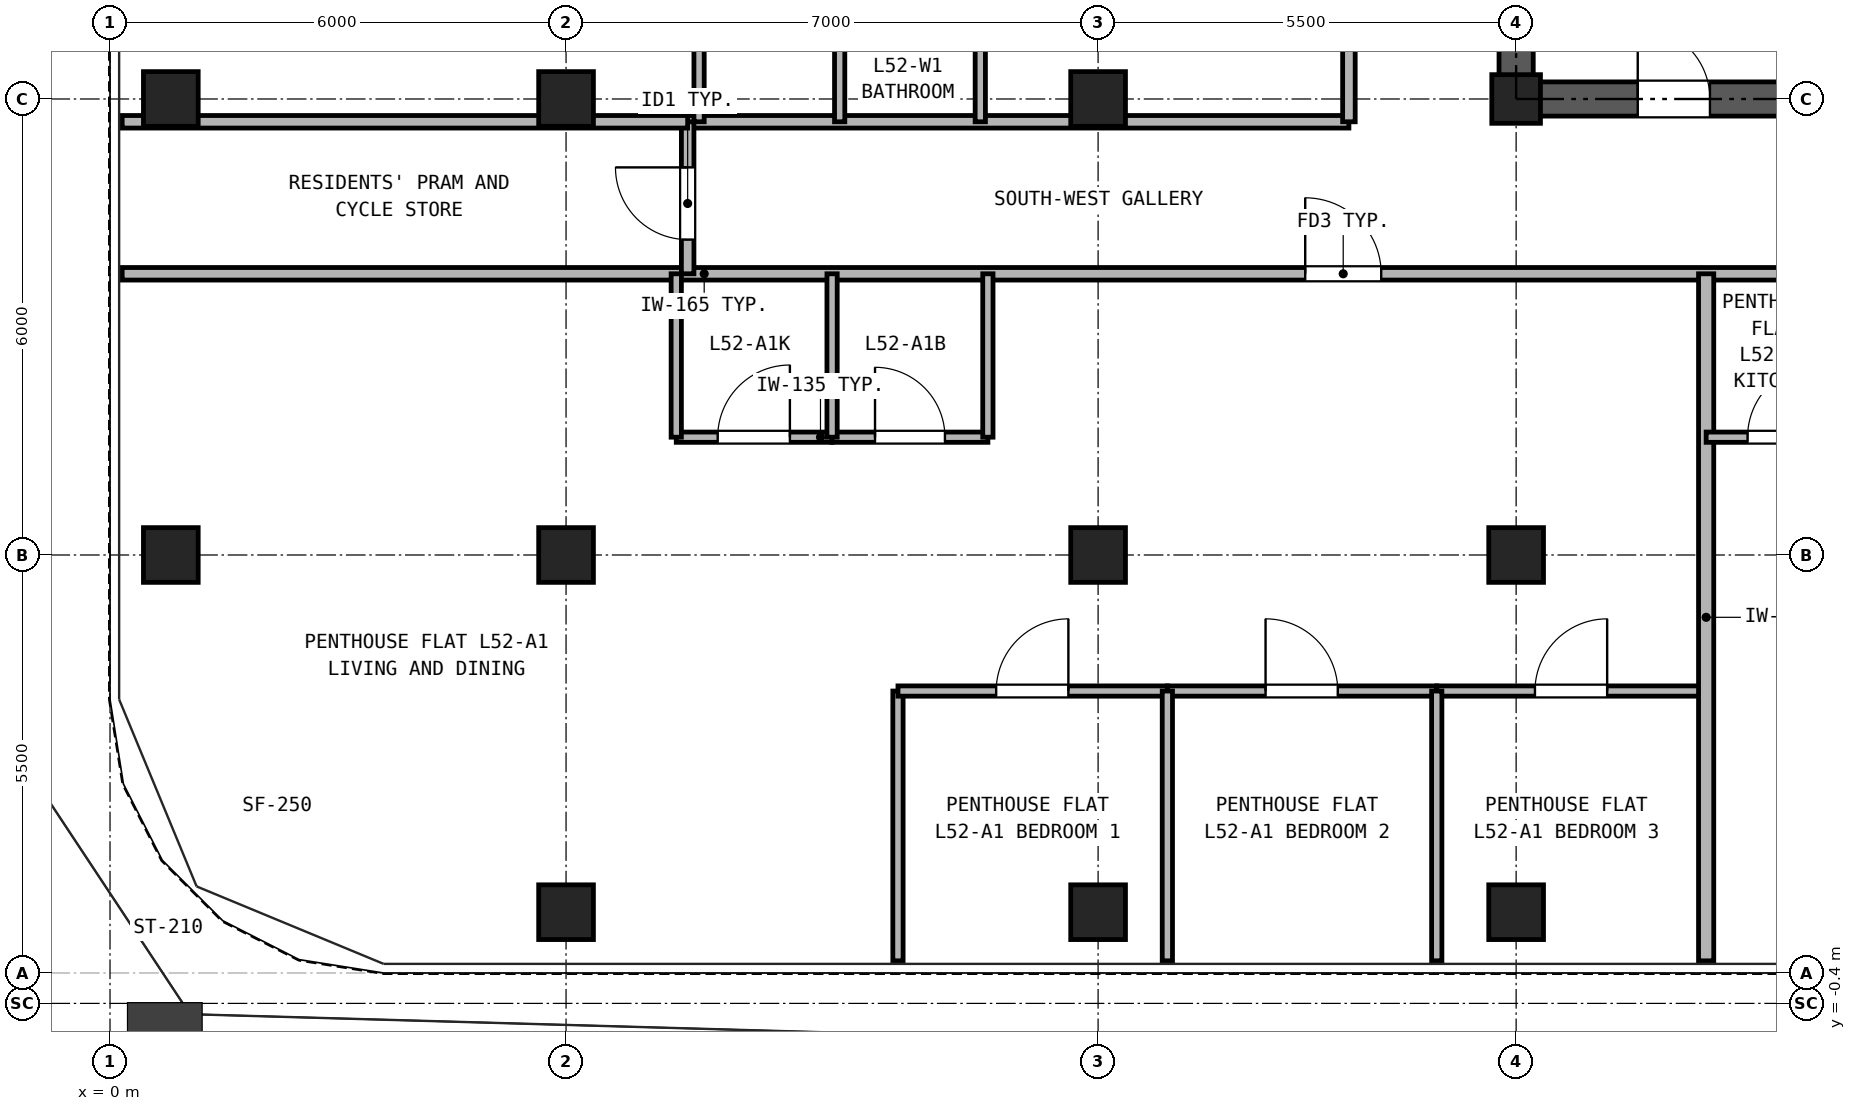
"""IFC4 building model, lengths in metres.
Left out: names, types, materials, properties, quantities, classifications, styles, units other than length and angle.
Written with IfcOpenShell. Run it as: python <this file> out.ifc"""

import sys

from ifc_helpers import new_model, si_unit, direction, frame, frame_2d, origin, origin_2d, place, context, subcontext, project, spatial, rectangle, hollow_rectangle, extrude, source, transform, mapped, element, fill, save


model = new_model("IFC4")
c1 = context("Model", 3, precision=1e-05, world=origin(), true_north=direction((0.0, 1.0)))
c2 = subcontext(c1, "Body", "Model", "MODEL_VIEW")
j1 = project(units=[si_unit("LENGTHUNIT", "METRE"), si_unit("PLANEANGLEUNIT", "RADIAN")], contexts=[c1])
p1 = place(None, origin())
s1 = spatial("IfcSite", under=j1, at=p1, CompositionType="ELEMENT")
p2 = place(p1, origin())
s2 = spatial("IfcBuilding", under=s1, at=p2, CompositionType="ELEMENT")
p3 = place(p2, frame((0.0, 0.0, 184.9)))
s3 = spatial("IfcBuildingStorey", under=s2, at=p3, CompositionType="ELEMENT", Elevation=184.9)
m1 = source(origin(), c2, "Body", "SweptSolid", [
    extrude(hollow_rectangle(XDim=0.72, YDim=0.72, WallThickness=0.04, at=origin_2d()), origin(), (0.0, 0.0, 1.0), 2.84),
])
for number, where, z_axis, x_axis in (
    (1, (6.0, 0.8, 0.0), (0.0, 0.0, 1.0), (1.0, 0.0, 0.0)),
    (2, (13.0, 0.8, 0.0), (0.0, 0.0, 1.0), (1.0, 0.0, 0.0)),
    (3, (18.5, 0.8, 0.0), (0.0, 0.0, 1.0), (1.0, 0.0, 0.0)),
    (4, (0.8, 5.5, 0.0), (0.0, 0.0, 1.0), (1.0, 0.0, 0.0)),
    (5, (0.8, 11.5, 0.0), (0.0, 0.0, 1.0), (1.0, 0.0, 0.0)),
    (6, (6.0, 5.5, 0.0), (0.0, 0.0, 1.0), (1.0, 0.0, 0.0)),
    (7, (6.0, 11.5, 0.0), (0.0, 0.0, 1.0), (1.0, 0.0, 0.0)),
    (8, (13.0, 5.5, 0.0), (0.0, 0.0, 1.0), (1.0, 0.0, 0.0)),
    (9, (13.0, 11.5, 0.0), (0.0, 0.0, 1.0), (1.0, 0.0, 0.0)),
    (10, (18.5, 5.5, 0.0), (0.0, 0.0, 1.0), (1.0, 0.0, 0.0)),
):
    element("IfcColumn", number, at=place(p3, frame(where, z_axis=z_axis, x_axis=x_axis)), inside=s3, PredefinedType="COLUMN", context=c2, shape_type="MappedRepresentation", body=[
        mapped(m1, transform((0.0, 0.0, 0.0), x_axis=(1.0, 0.0, 0.0), y_axis=(0.0, 1.0, 0.0), z_axis=(0.0, 0.0, 1.0), scale=1.0)),
    ])
m2 = source(origin(), c2, "Body", "SweptSolid", [
    extrude(hollow_rectangle(XDim=0.64, YDim=0.64, WallThickness=0.035, at=origin_2d()), origin(), (0.0, 0.0, 1.0), 2.84),
])
p4 = place(p3, frame((18.5, 11.5, 0.0), z_axis=(0.0, 0.0, 1.0), x_axis=(1.0, 0.0, 0.0)))
e11 = element("IfcColumn", 11, at=p4, inside=s3, PredefinedType="COLUMN", context=c2, shape_type="MappedRepresentation", body=[
    mapped(m2, transform((0.0, 0.0, 0.0), x_axis=(1.0, 0.0, 0.0), y_axis=(0.0, 1.0, 0.0), z_axis=(0.0, 0.0, 1.0), scale=1.0)),
])
p5 = place(p3, frame((18.275, 11.5, 0.0), z_axis=(0.0, 0.0, 1.0), x_axis=(1.0, 0.0, 0.0)))
e12 = element("IfcWall", 12, at=p5, inside=s3, PredefinedType="SHEAR", context=c2, shape_type="SweptSolid", body=[
    extrude(rectangle(XDim=10.45, YDim=0.45, at=frame_2d((5.225, 0.0))), origin(), (0.0, 0.0, 1.0), 2.84),
])
p6 = place(p5, frame((1.825, 0.0, 0.0)))
e13 = element("IfcOpeningElement", 13, at=p6, cuts=e12, PredefinedType="OPENING", context=c2, shape_type="SweptSolid", body=[
    extrude(rectangle(XDim=0.95, YDim=2.15, at=frame_2d((0.475, 1.075))), frame((0.0, 0.235, 0.0), z_axis=(0.0, -1.0, 0.0), x_axis=(1.0, 0.0, 0.0)), (0.0, 0.0, 1.0), 0.47),
])
p7 = place(p5, frame((5.325, 0.0, 0.0)))
e14 = element("IfcOpeningElement", 14, at=p7, cuts=e12, PredefinedType="OPENING", context=c2, shape_type="SweptSolid", body=[
    extrude(rectangle(XDim=0.95, YDim=2.15, at=frame_2d((0.475, 1.075))), frame((0.0, 0.235, 0.0), z_axis=(0.0, -1.0, 0.0), x_axis=(1.0, 0.0, 0.0)), (0.0, 0.0, 1.0), 0.47),
])
p8 = place(p5, frame((8.225, 0.0, 0.0)))
e15 = element("IfcOpeningElement", 15, at=p8, cuts=e12, PredefinedType="OPENING", context=c2, shape_type="SweptSolid", body=[
    extrude(rectangle(XDim=1.1, YDim=2.25, at=frame_2d((0.55, 1.125))), frame((0.0, 0.235, 0.0), z_axis=(0.0, -1.0, 0.0), x_axis=(1.0, 0.0, 0.0)), (0.0, 0.0, 1.0), 0.47),
])
p9 = place(p3, frame((18.5, 11.725, 0.0), z_axis=(0.0, 0.0, 1.0), x_axis=(0.0, 1.0, 0.0)))
e16 = element("IfcWall", 16, at=p9, inside=s3, PredefinedType="SHEAR", context=c2, shape_type="SweptSolid", body=[
    extrude(rectangle(XDim=16.8, YDim=0.45, at=frame_2d((8.4, 0.0))), origin(), (0.0, 0.0, 1.0), 2.84),
])
p10 = place(p9, frame((7.425, 0.0, 0.0)))
e17 = element("IfcOpeningElement", 17, at=p10, cuts=e16, PredefinedType="OPENING", context=c2, shape_type="SweptSolid", body=[
    extrude(rectangle(XDim=1.15, YDim=2.2, at=frame_2d((0.575, 1.1))), frame((0.0, 0.235, 0.0), z_axis=(0.0, -1.0, 0.0), x_axis=(1.0, 0.0, 0.0)), (0.0, 0.0, 1.0), 0.47),
])
p11 = place(p3, frame((0.16, 9.2, 0.0), z_axis=(0.0, 0.0, 1.0), x_axis=(1.0, 0.0, 0.0)))
e18 = element("IfcWall", 18, at=p11, inside=s3, PredefinedType="PARTITIONING", context=c2, shape_type="SweptSolid", body=[
    extrude(rectangle(XDim=41.48, YDim=0.165, at=frame_2d((20.74, 0.0))), origin(), (0.0, 0.0, 1.0), 2.84),
])
p12 = place(p11, frame((15.565, 0.0, 0.0)))
e19 = element("IfcOpeningElement", 19, at=p12, cuts=e18, PredefinedType="OPENING", context=c2, shape_type="SweptSolid", body=[
    extrude(rectangle(XDim=1.0, YDim=2.15, at=frame_2d((0.5, 1.075))), frame((0.0, 0.093, 0.0), z_axis=(0.0, -1.0, 0.0), x_axis=(1.0, 0.0, 0.0)), (0.0, 0.0, 1.0), 0.185),
])
p13 = place(p11, frame((30.94, 0.0, 0.0)))
e20 = element("IfcOpeningElement", 20, at=p13, cuts=e18, PredefinedType="OPENING", context=c2, shape_type="SweptSolid", body=[
    extrude(rectangle(XDim=1.0, YDim=2.15, at=frame_2d((0.5, 1.075))), frame((0.0, 0.093, 0.0), z_axis=(0.0, -1.0, 0.0), x_axis=(1.0, 0.0, 0.0)), (0.0, 0.0, 1.0), 0.185),
])
p14 = place(p3, frame((7.6, 11.2, 0.0), z_axis=(0.0, 0.0, 1.0), x_axis=(1.0, 0.0, 0.0)))
e21 = element("IfcWall", 21, at=p14, inside=s3, PredefinedType="PARTITIONING", context=c2, shape_type="SweptSolid", body=[
    extrude(rectangle(XDim=8.7, YDim=0.165, at=frame_2d((4.35, 0.0))), origin(), (0.0, 0.0, 1.0), 2.84),
])
p15 = place(p3, frame((7.6, 9.2, 0.0), z_axis=(0.0, 0.0, 1.0), x_axis=(0.0, 1.0, 0.0)))
e22 = element("IfcWall", 22, at=p15, inside=s3, PredefinedType="PARTITIONING", context=c2, shape_type="SweptSolid", body=[
    extrude(rectangle(XDim=2.0, YDim=0.165, at=frame_2d((1.0, 0.0))), origin(), (0.0, 0.0, 1.0), 2.84),
])
p16 = place(p15, frame((0.45, 0.0, 0.0)))
e23 = element("IfcOpeningElement", 23, at=p16, cuts=e22, PredefinedType="OPENING", context=c2, shape_type="SweptSolid", body=[
    extrude(rectangle(XDim=0.95, YDim=2.15, at=frame_2d((0.475, 1.075))), frame((0.0, 0.093, 0.0), z_axis=(0.0, -1.0, 0.0), x_axis=(1.0, 0.0, 0.0)), (0.0, 0.0, 1.0), 0.185),
])
p17 = place(p3, frame((16.3, 11.2, 0.0), z_axis=(0.0, 0.0, 1.0), x_axis=(0.0, 1.0, 0.0)))
e24 = element("IfcWall", 24, at=p17, inside=s3, PredefinedType="PARTITIONING", context=c2, shape_type="SweptSolid", body=[
    extrude(rectangle(XDim=23.94, YDim=0.165, at=frame_2d((11.97, 0.0))), origin(), (0.0, 0.0, 1.0), 2.84),
])
p18 = place(p17, frame((5.4, 0.0, 0.0)))
e25 = element("IfcOpeningElement", 25, at=p18, cuts=e24, PredefinedType="OPENING", context=c2, shape_type="SweptSolid", body=[
    extrude(rectangle(XDim=1.0, YDim=2.15, at=frame_2d((0.5, 1.075))), frame((0.0, 0.093, 0.0), z_axis=(0.0, -1.0, 0.0), x_axis=(1.0, 0.0, 0.0)), (0.0, 0.0, 1.0), 0.185),
])
p19 = place(p17, frame((14.95, 0.0, 0.0)))
e26 = element("IfcOpeningElement", 26, at=p19, cuts=e24, PredefinedType="OPENING", context=c2, shape_type="SweptSolid", body=[
    extrude(rectangle(XDim=1.0, YDim=2.15, at=frame_2d((0.5, 1.075))), frame((0.0, 0.093, 0.0), z_axis=(0.0, -1.0, 0.0), x_axis=(1.0, 0.0, 0.0)), (0.0, 0.0, 1.0), 0.185),
])
p20 = place(p3, frame((7.45, 7.05, 0.0), z_axis=(0.0, 0.0, 1.0), x_axis=(1.0, 0.0, 0.0)))
e27 = element("IfcWall", 27, at=p20, inside=s3, PredefinedType="PARTITIONING", context=c2, shape_type="SweptSolid", body=[
    extrude(rectangle(XDim=2.05, YDim=0.135, at=frame_2d((1.025, 0.0))), origin(), (0.0, 0.0, 1.0), 2.84),
])
p21 = place(p20, frame((0.545, 0.0, 0.0)))
e28 = element("IfcOpeningElement", 28, at=p21, cuts=e27, PredefinedType="OPENING", context=c2, shape_type="SweptSolid", body=[
    extrude(rectangle(XDim=0.95, YDim=2.15, at=frame_2d((0.475, 1.075))), frame((0.0, 0.077, 0.0), z_axis=(0.0, -1.0, 0.0), x_axis=(1.0, 0.0, 0.0)), (0.0, 0.0, 1.0), 0.155),
])
p22 = place(p3, frame((9.5, 7.05, 0.0), z_axis=(0.0, 0.0, 1.0), x_axis=(1.0, 0.0, 0.0)))
e29 = element("IfcWall", 29, at=p22, inside=s3, PredefinedType="PARTITIONING", context=c2, shape_type="SweptSolid", body=[
    extrude(rectangle(XDim=2.05, YDim=0.135, at=frame_2d((1.025, 0.0))), origin(), (0.0, 0.0, 1.0), 2.84),
])
p23 = place(p22, frame((0.565, 0.0, 0.0)))
e30 = element("IfcOpeningElement", 30, at=p23, cuts=e29, PredefinedType="OPENING", context=c2, shape_type="SweptSolid", body=[
    extrude(rectangle(XDim=0.92, YDim=2.1, at=frame_2d((0.46, 1.05))), frame((0.0, 0.077, 0.0), z_axis=(0.0, -1.0, 0.0), x_axis=(1.0, 0.0, 0.0)), (0.0, 0.0, 1.0), 0.155),
])
for number, where, z_axis, x_axis in (
    (31, (7.45, 7.05, 0.0), (0.0, 0.0, 1.0), (0.0, 1.0, 0.0)),
    (32, (9.5, 7.05, 0.0), (0.0, 0.0, 1.0), (0.0, 1.0, 0.0)),
    (33, (11.55, 7.05, 0.0), (0.0, 0.0, 1.0), (0.0, 1.0, 0.0)),
):
    element("IfcWall", number, at=place(p3, frame(where, z_axis=z_axis, x_axis=x_axis)), inside=s3, PredefinedType="PARTITIONING", context=c2, shape_type="SweptSolid", body=[
        extrude(rectangle(XDim=2.15, YDim=0.135, at=frame_2d((1.075, 0.0))), origin(), (0.0, 0.0, 1.0), 2.84),
    ])
p24 = place(p3, frame((10.367, 0.16, 0.0), z_axis=(0.0, 0.0, 1.0), x_axis=(0.0, 1.0, 0.0)))
e34 = element("IfcWall", 34, at=p24, inside=s3, PredefinedType="PARTITIONING", context=c2, shape_type="SweptSolid", body=[
    extrude(rectangle(XDim=3.55, YDim=0.135, at=frame_2d((1.775, 0.0))), origin(), (0.0, 0.0, 1.0), 2.84),
])
p25 = place(p3, frame((10.367, 3.71, 0.0), z_axis=(0.0, 0.0, 1.0), x_axis=(1.0, 0.0, 0.0)))
e35 = element("IfcWall", 35, at=p25, inside=s3, PredefinedType="PARTITIONING", context=c2, shape_type="SweptSolid", body=[
    extrude(rectangle(XDim=3.544, YDim=0.135, at=frame_2d((1.772, 0.0))), origin(), (0.0, 0.0, 1.0), 2.84),
])
p26 = place(p25, frame((1.292, 0.0, 0.0)))
e36 = element("IfcOpeningElement", 36, at=p26, cuts=e35, PredefinedType="OPENING", context=c2, shape_type="SweptSolid", body=[
    extrude(rectangle(XDim=0.95, YDim=2.15, at=frame_2d((0.475, 1.075))), frame((0.0, 0.077, 0.0), z_axis=(0.0, -1.0, 0.0), x_axis=(1.0, 0.0, 0.0)), (0.0, 0.0, 1.0), 0.155),
])
p27 = place(p3, frame((13.911, 3.71, 0.0), z_axis=(0.0, 0.0, 1.0), x_axis=(1.0, 0.0, 0.0)))
e37 = element("IfcWall", 37, at=p27, inside=s3, PredefinedType="PARTITIONING", context=c2, shape_type="SweptSolid", body=[
    extrude(rectangle(XDim=3.544, YDim=0.135, at=frame_2d((1.772, 0.0))), origin(), (0.0, 0.0, 1.0), 2.84),
])
p28 = place(p27, frame((1.292, 0.0, 0.0)))
e38 = element("IfcOpeningElement", 38, at=p28, cuts=e37, PredefinedType="OPENING", context=c2, shape_type="SweptSolid", body=[
    extrude(rectangle(XDim=0.95, YDim=2.15, at=frame_2d((0.475, 1.075))), frame((0.0, 0.077, 0.0), z_axis=(0.0, -1.0, 0.0), x_axis=(1.0, 0.0, 0.0)), (0.0, 0.0, 1.0), 0.155),
])
p29 = place(p3, frame((13.911, 0.16, 0.0), z_axis=(0.0, 0.0, 1.0), x_axis=(0.0, 1.0, 0.0)))
e39 = element("IfcWall", 39, at=p29, inside=s3, PredefinedType="PARTITIONING", context=c2, shape_type="SweptSolid", body=[
    extrude(rectangle(XDim=3.55, YDim=0.135, at=frame_2d((1.775, 0.0))), origin(), (0.0, 0.0, 1.0), 2.84),
])
p30 = place(p3, frame((17.456, 3.71, 0.0), z_axis=(0.0, 0.0, 1.0), x_axis=(1.0, 0.0, 0.0)))
e40 = element("IfcWall", 40, at=p30, inside=s3, PredefinedType="PARTITIONING", context=c2, shape_type="SweptSolid", body=[
    extrude(rectangle(XDim=3.544, YDim=0.135, at=frame_2d((1.772, 0.0))), origin(), (0.0, 0.0, 1.0), 2.84),
])
p31 = place(p30, frame((1.292, 0.0, 0.0)))
e41 = element("IfcOpeningElement", 41, at=p31, cuts=e40, PredefinedType="OPENING", context=c2, shape_type="SweptSolid", body=[
    extrude(rectangle(XDim=0.95, YDim=2.15, at=frame_2d((0.475, 1.075))), frame((0.0, 0.077, 0.0), z_axis=(0.0, -1.0, 0.0), x_axis=(1.0, 0.0, 0.0)), (0.0, 0.0, 1.0), 0.155),
])
p32 = place(p3, frame((17.456, 0.16, 0.0), z_axis=(0.0, 0.0, 1.0), x_axis=(0.0, 1.0, 0.0)))
e42 = element("IfcWall", 42, at=p32, inside=s3, PredefinedType="PARTITIONING", context=c2, shape_type="SweptSolid", body=[
    extrude(rectangle(XDim=3.55, YDim=0.135, at=frame_2d((1.775, 0.0))), origin(), (0.0, 0.0, 1.0), 2.84),
])
p33 = place(p3, frame((21.0, 0.16, 0.0), z_axis=(0.0, 0.0, 1.0), x_axis=(0.0, 1.0, 0.0)))
e43 = element("IfcWall", 43, at=p33, inside=s3, PredefinedType="PARTITIONING", context=c2, shape_type="SweptSolid", body=[
    extrude(rectangle(XDim=9.04, YDim=0.2, at=frame_2d((4.52, 0.0))), origin(), (0.0, 0.0, 1.0), 2.84),
])
p34 = place(p3, frame((21.0, 7.05, 0.0), z_axis=(0.0, 0.0, 1.0), x_axis=(1.0, 0.0, 0.0)))
e44 = element("IfcWall", 44, at=p34, inside=s3, PredefinedType="PARTITIONING", context=c2, shape_type="SweptSolid", body=[
    extrude(rectangle(XDim=2.05, YDim=0.135, at=frame_2d((1.025, 0.0))), origin(), (0.0, 0.0, 1.0), 2.84),
])
p35 = place(p34, frame((0.545, 0.0, 0.0)))
e45 = element("IfcOpeningElement", 45, at=p35, cuts=e44, PredefinedType="OPENING", context=c2, shape_type="SweptSolid", body=[
    extrude(rectangle(XDim=0.95, YDim=2.15, at=frame_2d((0.475, 1.075))), frame((0.0, 0.077, 0.0), z_axis=(0.0, -1.0, 0.0), x_axis=(1.0, 0.0, 0.0)), (0.0, 0.0, 1.0), 0.155),
])
p36 = place(p3, frame((0.16, 11.2, 0.0), z_axis=(0.0, 0.0, 1.0), x_axis=(1.0, 0.0, 0.0)))
e46 = element("IfcWall", 46, at=p36, inside=s3, PredefinedType="PARTITIONING", context=c2, shape_type="SweptSolid", body=[
    extrude(rectangle(XDim=7.44, YDim=0.165, at=frame_2d((3.72, 0.0))), origin(), (0.0, 0.0, 1.0), 2.84),
])
for number, where, z_axis, x_axis in (
    (47, (7.75, 11.2, 0.0), (0.0, 0.0, 1.0), (0.0, 1.0, 0.0)),
    (48, (9.6, 11.2, 0.0), (0.0, 0.0, 1.0), (0.0, 1.0, 0.0)),
    (49, (11.45, 11.2, 0.0), (0.0, 0.0, 1.0), (0.0, 1.0, 0.0)),
):
    element("IfcWall", number, at=place(p3, frame(where, z_axis=z_axis, x_axis=x_axis)), inside=s3, PredefinedType="PARTITIONING", context=c2, shape_type="SweptSolid", body=[
        extrude(rectangle(XDim=2.15, YDim=0.135, at=frame_2d((1.075, 0.0))), origin(), (0.0, 0.0, 1.0), 2.84),
    ])
p37 = place(p6, frame((0.95, 0.0, 0.0), z_axis=(0.0, 0.0, 1.0), x_axis=(-1.0, 0.0, 0.0)))
e50 = element("IfcDoor", 50, at=p37, inside=s3, OperationType="SINGLE_SWING_LEFT", PredefinedType="DOOR", context=c2, shape_type="SweptSolid", body=[
    extrude(rectangle(XDim=0.95, YDim=2.15, at=frame_2d((0.475, 1.075))), frame((0.0, 0.025, 0.0), z_axis=(0.0, -1.0, 0.0), x_axis=(1.0, 0.0, 0.0)), (0.0, 0.0, 1.0), 0.05),
])
fill(e13, e50)
p38 = place(p21, origin())
e51 = element("IfcDoor", 51, at=p38, inside=s3, OperationType="SINGLE_SWING_RIGHT", PredefinedType="DOOR", context=c2, shape_type="SweptSolid", body=[
    extrude(rectangle(XDim=0.95, YDim=2.15, at=frame_2d((0.475, 1.075))), frame((0.0, 0.025, 0.0), z_axis=(0.0, -1.0, 0.0), x_axis=(1.0, 0.0, 0.0)), (0.0, 0.0, 1.0), 0.05),
])
fill(e28, e51)
p39 = place(p23, origin())
e52 = element("IfcDoor", 52, at=p39, inside=s3, OperationType="SINGLE_SWING_LEFT", PredefinedType="DOOR", context=c2, shape_type="SweptSolid", body=[
    extrude(rectangle(XDim=0.92, YDim=2.1, at=frame_2d((0.46, 1.05))), frame((0.0, 0.025, 0.0), z_axis=(0.0, -1.0, 0.0), x_axis=(1.0, 0.0, 0.0)), (0.0, 0.0, 1.0), 0.05),
])
fill(e30, e52)
p40 = place(p26, frame((0.95, 0.0, 0.0), z_axis=(0.0, 0.0, 1.0), x_axis=(-1.0, 0.0, 0.0)))
e53 = element("IfcDoor", 53, at=p40, inside=s3, OperationType="SINGLE_SWING_RIGHT", PredefinedType="DOOR", context=c2, shape_type="SweptSolid", body=[
    extrude(rectangle(XDim=0.95, YDim=2.15, at=frame_2d((0.475, 1.075))), frame((0.0, 0.025, 0.0), z_axis=(0.0, -1.0, 0.0), x_axis=(1.0, 0.0, 0.0)), (0.0, 0.0, 1.0), 0.05),
])
fill(e36, e53)
p41 = place(p28, frame((0.95, 0.0, 0.0), z_axis=(0.0, 0.0, 1.0), x_axis=(-1.0, 0.0, 0.0)))
e54 = element("IfcDoor", 54, at=p41, inside=s3, OperationType="SINGLE_SWING_LEFT", PredefinedType="DOOR", context=c2, shape_type="SweptSolid", body=[
    extrude(rectangle(XDim=0.95, YDim=2.15, at=frame_2d((0.475, 1.075))), frame((0.0, 0.025, 0.0), z_axis=(0.0, -1.0, 0.0), x_axis=(1.0, 0.0, 0.0)), (0.0, 0.0, 1.0), 0.05),
])
fill(e38, e54)
p42 = place(p31, frame((0.95, 0.0, 0.0), z_axis=(0.0, 0.0, 1.0), x_axis=(-1.0, 0.0, 0.0)))
e55 = element("IfcDoor", 55, at=p42, inside=s3, OperationType="SINGLE_SWING_RIGHT", PredefinedType="DOOR", context=c2, shape_type="SweptSolid", body=[
    extrude(rectangle(XDim=0.95, YDim=2.15, at=frame_2d((0.475, 1.075))), frame((0.0, 0.025, 0.0), z_axis=(0.0, -1.0, 0.0), x_axis=(1.0, 0.0, 0.0)), (0.0, 0.0, 1.0), 0.05),
])
fill(e41, e55)
p43 = place(p12, frame((1.0, 0.0, 0.0), z_axis=(0.0, 0.0, 1.0), x_axis=(-1.0, 0.0, 0.0)))
e56 = element("IfcDoor", 56, at=p43, inside=s3, OperationType="SINGLE_SWING_LEFT", PredefinedType="DOOR", context=c2, shape_type="SweptSolid", body=[
    extrude(rectangle(XDim=1.0, YDim=2.15, at=frame_2d((0.5, 1.075))), frame((0.0, 0.025, 0.0), z_axis=(0.0, -1.0, 0.0), x_axis=(1.0, 0.0, 0.0)), (0.0, 0.0, 1.0), 0.05),
])
fill(e19, e56)
p44 = place(p35, origin())
e57 = element("IfcDoor", 57, at=p44, inside=s3, OperationType="SINGLE_SWING_RIGHT", PredefinedType="DOOR", context=c2, shape_type="SweptSolid", body=[
    extrude(rectangle(XDim=0.95, YDim=2.15, at=frame_2d((0.475, 1.075))), frame((0.0, 0.025, 0.0), z_axis=(0.0, -1.0, 0.0), x_axis=(1.0, 0.0, 0.0)), (0.0, 0.0, 1.0), 0.05),
])
fill(e45, e57)
p45 = place(p16, frame((0.95, 0.0, 0.0), z_axis=(0.0, 0.0, 1.0), x_axis=(-1.0, 0.0, 0.0)))
e58 = element("IfcDoor", 58, at=p45, inside=s3, OperationType="SINGLE_SWING_RIGHT", PredefinedType="DOOR", context=c2, shape_type="SweptSolid", body=[
    extrude(rectangle(XDim=0.95, YDim=2.15, at=frame_2d((0.475, 1.075))), frame((0.0, 0.025, 0.0), z_axis=(0.0, -1.0, 0.0), x_axis=(1.0, 0.0, 0.0)), (0.0, 0.0, 1.0), 0.05),
])
fill(e23, e58)
save(model, sys.argv[1])
